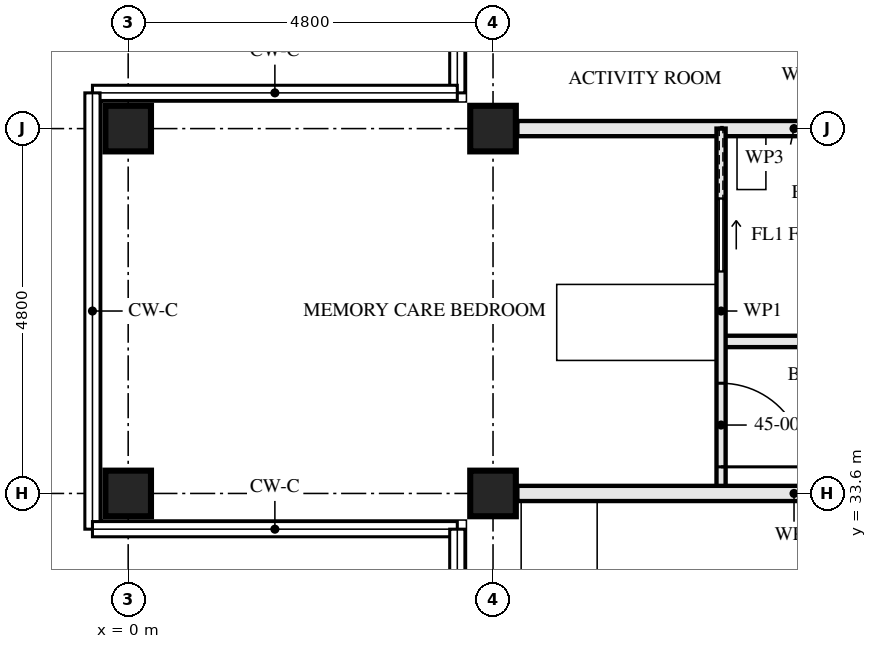
"""IFC4 building model, lengths in metres.
Left out: names, types, materials, properties, quantities, classifications, styles, units other than length and angle.
Written with IfcOpenShell. Run it as: python <this file> out.ifc"""

import sys

from ifc_helpers import new_model, si_unit, direction, frame, frame_2d, origin, origin_2d, place, context, subcontext, project, spatial, rectangle, hollow_rectangle, extrude, element, fill, save


model = new_model("IFC4")
c1 = context("Model", 3, precision=1e-05, world=origin(), true_north=direction((0.0, 1.0)))
c2 = subcontext(c1, "Body", "Model", "MODEL_VIEW")
j1 = project(units=[si_unit("LENGTHUNIT", "METRE"), si_unit("PLANEANGLEUNIT", "RADIAN")], contexts=[c1])
p1 = place(None, origin())
s1 = spatial("IfcSite", under=j1, at=p1, CompositionType="ELEMENT")
p2 = place(p1, origin())
s2 = spatial("IfcBuilding", under=s1, at=p2, CompositionType="ELEMENT")
p3 = place(p2, frame((0.0, 0.0, 165.5)))
s3 = spatial("IfcBuildingStorey", under=s2, at=p3, CompositionType="ELEMENT", Elevation=165.5)
for number, where, z_axis, x_axis in (
    (1, (0.0, 33.6, 0.0), (0.0, 0.0, 1.0), (0.0, 1.0, 0.0)),
    (2, (0.0, 38.4, 0.0), (0.0, 0.0, 1.0), (0.0, 1.0, 0.0)),
    (3, (4.8, 33.6, 0.0), (0.0, 0.0, 1.0), (0.0, 1.0, 0.0)),
    (4, (4.8, 38.4, 0.0), (0.0, 0.0, 1.0), (0.0, 1.0, 0.0)),
):
    element("IfcColumn", number, at=place(p3, frame(where, z_axis=z_axis, x_axis=x_axis)), inside=s3, PredefinedType="COLUMN", context=c2, shape_type="SweptSolid", body=[
        extrude(hollow_rectangle(XDim=0.6, YDim=0.6, WallThickness=0.06, at=origin_2d()), origin(), (0.0, 0.0, 1.0), 3.5),
    ])
p4 = place(p3, frame((5.12, 38.4, 0.0), z_axis=(0.0, 0.0, 1.0), x_axis=(1.0, 0.0, 0.0)))
e5 = element("IfcWall", 5, at=p4, inside=s3, PredefinedType="PARTITIONING", context=c2, shape_type="SweptSolid", body=[
    extrude(rectangle(XDim=7.28, YDim=0.2, at=frame_2d((3.64, 0.0))), origin(), (0.0, 0.0, 1.0), 2.55),
])
p5 = place(p3, frame((7.8, 35.6, 0.0), z_axis=(0.0, 0.0, 1.0), x_axis=(1.0, 0.0, 0.0)))
e6 = element("IfcWall", 6, at=p5, inside=s3, PredefinedType="PARTITIONING", context=c2, shape_type="SweptSolid", body=[
    extrude(rectangle(XDim=3.0, YDim=0.15, at=frame_2d((1.5, 0.0))), origin(), (0.0, 0.0, 1.0), 3.33),
])
p6 = place(p3, frame((7.8, 38.4, 0.0), z_axis=(0.0, 0.0, 1.0), x_axis=(0.0, -1.0, 0.0)))
e7 = element("IfcWall", 7, at=p6, inside=s3, PredefinedType="PARTITIONING", context=c2, shape_type="SweptSolid", body=[
    extrude(rectangle(XDim=4.8, YDim=0.12, at=frame_2d((2.4, 0.0))), origin(), (0.0, 0.0, 1.0), 3.33),
])
p7 = place(p6, frame((3.35, 0.0, 0.0)))
e8 = element("IfcOpeningElement", 8, at=p7, cuts=e7, PredefinedType="OPENING", context=c2, shape_type="SweptSolid", body=[
    extrude(rectangle(XDim=1.1, YDim=2.1, at=frame_2d((0.55, 1.05))), frame((0.0, 0.071, 0.0), z_axis=(0.0, -1.0, 0.0), x_axis=(1.0, 0.0, 0.0)), (0.0, 0.0, 1.0), 0.141),
])
p8 = place(p6, frame((0.925, 0.0, 0.0)))
e9 = element("IfcOpeningElement", 9, at=p8, cuts=e7, PredefinedType="OPENING", context=c2, shape_type="SweptSolid", body=[
    extrude(rectangle(XDim=0.95, YDim=2.1, at=frame_2d((0.475, 1.05))), frame((0.0, 0.071, 0.0), z_axis=(0.0, -1.0, 0.0), x_axis=(1.0, 0.0, 0.0)), (0.0, 0.0, 1.0), 0.141),
])
p9 = place(p3, frame((5.12, 33.6, 0.0), z_axis=(0.0, 0.0, 1.0), x_axis=(1.0, 0.0, 0.0)))
e10 = element("IfcWall", 10, at=p9, inside=s3, PredefinedType="PARTITIONING", context=c2, shape_type="SweptSolid", body=[
    extrude(rectangle(XDim=7.28, YDim=0.2, at=frame_2d((3.64, 0.0))), origin(), (0.0, 0.0, 1.0), 2.55),
])
p10 = place(p7, origin())
e11 = element("IfcDoor", 11, at=p10, inside=s3, OperationType="SINGLE_SWING_LEFT", PredefinedType="DOOR", context=c2, shape_type="SweptSolid", body=[
    extrude(rectangle(XDim=1.1, YDim=2.1, at=frame_2d((0.55, 1.05))), frame((0.0, 0.022, 0.0), z_axis=(0.0, -1.0, 0.0), x_axis=(1.0, 0.0, 0.0)), (0.0, 0.0, 1.0), 0.044),
])
fill(e8, e11)
p11 = place(p8, origin())
e12 = element("IfcDoor", 12, at=p11, inside=s3, OperationType="SLIDING_TO_RIGHT", PredefinedType="DOOR", context=c2, shape_type="SweptSolid", body=[
    extrude(rectangle(XDim=0.95, YDim=2.1, at=frame_2d((0.475, 1.05))), frame((0.0, 0.022, 0.0), z_axis=(0.0, -1.0, 0.0), x_axis=(1.0, 0.0, 0.0)), (0.0, 0.0, 1.0), 0.044),
])
fill(e9, e12)
save(model, sys.argv[1])
